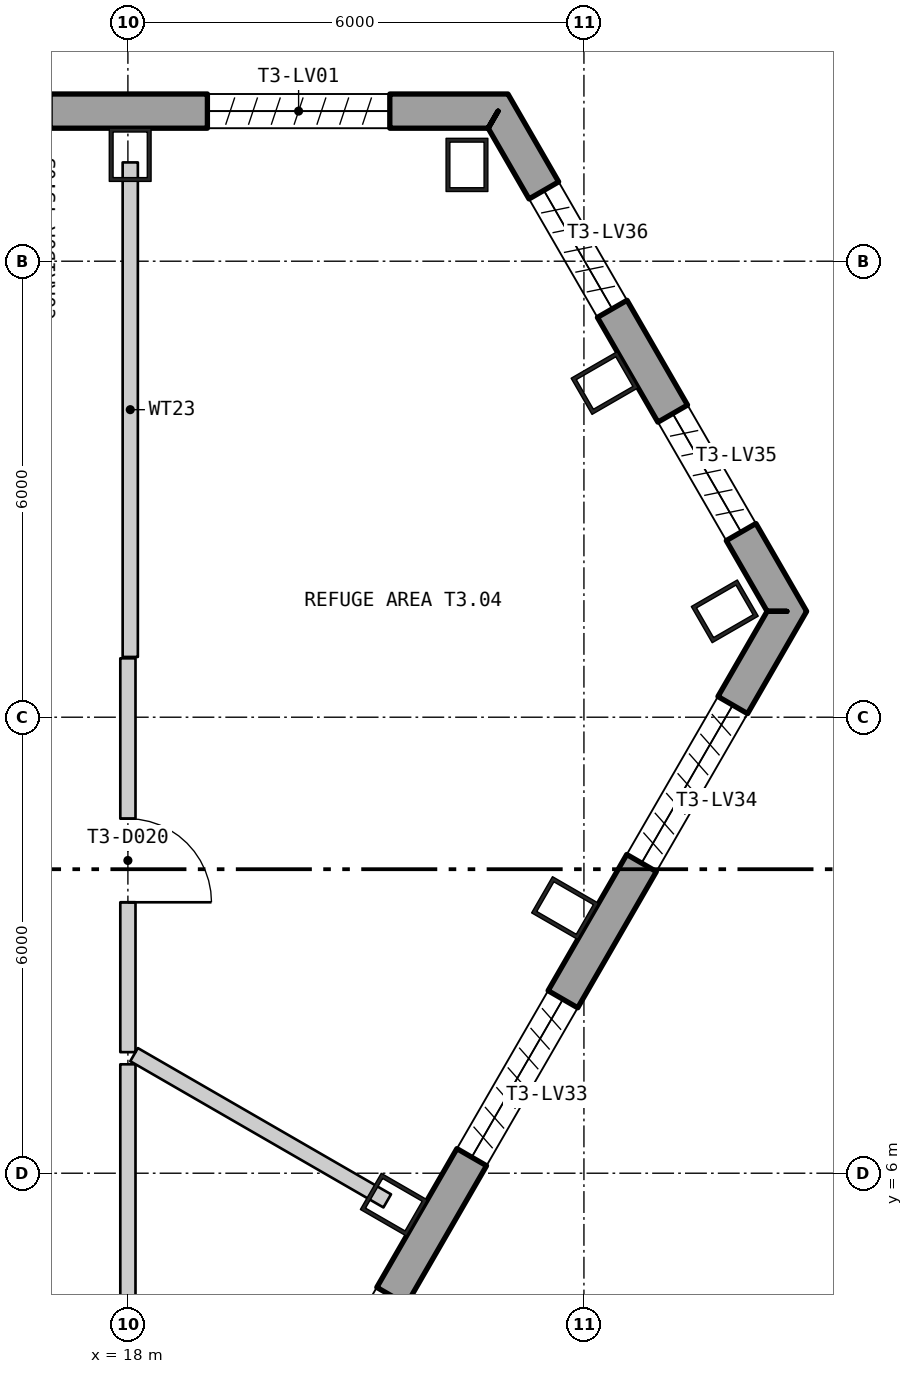
"""IFC4 building model, lengths in metres.
Left out: names, types, materials, properties, quantities, classifications, styles, units other than length and angle.
Written with IfcOpenShell. Run it as: python <this file> out.ifc"""

import sys

from ifc_helpers import new_model, si_unit, direction, frame, frame_2d, origin, origin_2d, place, context, subcontext, project, spatial, polyline, rectangle, hollow_rectangle, outline, extrude, element, fill, save


model = new_model("IFC4")
c1 = context("Model", 3, precision=1e-05, world=origin(), true_north=direction((0.0, 1.0)))
c2 = subcontext(c1, "Body", "Model", "MODEL_VIEW")
j1 = project(units=[si_unit("LENGTHUNIT", "METRE"), si_unit("PLANEANGLEUNIT", "RADIAN")], contexts=[c1])
p1 = place(None, origin())
s1 = spatial("IfcSite", under=j1, at=p1, CompositionType="ELEMENT")
p2 = place(p1, origin())
s2 = spatial("IfcBuilding", under=s1, at=p2, CompositionType="ELEMENT")
p3 = place(p2, frame((0.0, 0.0, 186.6)))
s3 = spatial("IfcBuildingStorey", under=s2, at=p3, CompositionType="ELEMENT", Elevation=186.6)
for number, where, z_axis, x_axis in (
    (1, (22.461, 19.267, 0.0), (0.0, 0.0, 1.0), (-1.0, 0.0, 0.0)),
    (2, (18.03, 19.4, 0.0), (0.0, 0.0, 1.0), (-1.0, 0.0, 0.0)),
    (3, (21.499, 5.586, 0.0), (0.0, 0.0, 1.0), (0.5, 0.866, 0.0)),
    (4, (23.752, 9.489, 0.0), (0.0, 0.0, 1.0), (0.5, 0.866, 0.0)),
    (5, (25.853, 13.393, 0.0), (0.0, 0.0, 1.0), (-0.5, 0.866, 0.0)),
    (6, (24.272, 16.397, 0.0), (0.0, 0.0, 1.0), (-0.5, 0.866, 0.0)),
):
    element("IfcColumn", number, at=place(p3, frame(where, z_axis=z_axis, x_axis=x_axis)), inside=s3, PredefinedType="COLUMN", context=c2, shape_type="SweptSolid", body=[
        extrude(hollow_rectangle(XDim=0.55, YDim=0.7, WallThickness=0.05, at=origin_2d()), origin(), (0.0, 0.0, 1.0), 6.0),
    ])
p4 = place(p3, frame((22.87, 19.975, -0.4), z_axis=(0.0, 0.0, 1.0), x_axis=(-1.0, 0.0, 0.0)))
e7 = element("IfcWall", 7, at=p4, inside=s3, PredefinedType="SOLIDWALL", context=c2, shape_type="SweptSolid", body=[
    extrude(outline(polyline([(-0.13, -0.225), (45.87, -0.225), (45.61, 0.225), (0.13, 0.225), (-0.13, -0.225)])), origin(), (0.0, 0.0, 1.0), 6.0),
])
p5 = place(p4, frame((1.424, 0.0, 1.6)))
e8 = element("IfcOpeningElement", 8, at=p5, cuts=e7, PredefinedType="OPENING", context=c2, shape_type="SweptSolid", body=[
    extrude(rectangle(XDim=2.4, YDim=3.6, at=frame_2d((1.2, 1.8))), frame((0.0, 0.235, 0.0), z_axis=(0.0, -1.0, 0.0), x_axis=(1.0, 0.0, 0.0)), (0.0, 0.0, 1.0), 0.47),
])
p6 = place(p4, frame((5.893, 0.0, 1.6)))
e9 = element("IfcOpeningElement", 9, at=p6, cuts=e7, PredefinedType="OPENING", context=c2, shape_type="SweptSolid", body=[
    extrude(rectangle(XDim=2.4, YDim=3.6, at=frame_2d((1.2, 1.8))), frame((0.0, 0.235, 0.0), z_axis=(0.0, -1.0, 0.0), x_axis=(1.0, 0.0, 0.0)), (0.0, 0.0, 1.0), 0.47),
])
p7 = place(p4, frame((10.401, 0.0, 1.6)))
e10 = element("IfcOpeningElement", 10, at=p7, cuts=e7, PredefinedType="OPENING", context=c2, shape_type="SweptSolid", body=[
    extrude(rectangle(XDim=2.4, YDim=3.6, at=frame_2d((1.2, 1.8))), frame((0.0, 0.235, 0.0), z_axis=(0.0, -1.0, 0.0), x_axis=(1.0, 0.0, 0.0)), (0.0, 0.0, 1.0), 0.47),
])
p8 = place(p4, frame((14.909, 0.0, 1.6)))
e11 = element("IfcOpeningElement", 11, at=p8, cuts=e7, PredefinedType="OPENING", context=c2, shape_type="SweptSolid", body=[
    extrude(rectangle(XDim=2.4, YDim=3.6, at=frame_2d((1.2, 1.8))), frame((0.0, 0.235, 0.0), z_axis=(0.0, -1.0, 0.0), x_axis=(1.0, 0.0, 0.0)), (0.0, 0.0, 1.0), 0.47),
])
p9 = place(p4, frame((19.416, 0.0, 1.6)))
e12 = element("IfcOpeningElement", 12, at=p9, cuts=e7, PredefinedType="OPENING", context=c2, shape_type="SweptSolid", body=[
    extrude(rectangle(XDim=2.4, YDim=3.6, at=frame_2d((1.2, 1.8))), frame((0.0, 0.235, 0.0), z_axis=(0.0, -1.0, 0.0), x_axis=(1.0, 0.0, 0.0)), (0.0, 0.0, 1.0), 0.47),
])
p10 = place(p4, frame((23.924, 0.0, 1.6)))
e13 = element("IfcOpeningElement", 13, at=p10, cuts=e7, PredefinedType="OPENING", context=c2, shape_type="SweptSolid", body=[
    extrude(rectangle(XDim=2.4, YDim=3.6, at=frame_2d((1.2, 1.8))), frame((0.0, 0.235, 0.0), z_axis=(0.0, -1.0, 0.0), x_axis=(1.0, 0.0, 0.0)), (0.0, 0.0, 1.0), 0.47),
])
p11 = place(p4, frame((28.431, 0.0, 1.6)))
e14 = element("IfcOpeningElement", 14, at=p11, cuts=e7, PredefinedType="OPENING", context=c2, shape_type="SweptSolid", body=[
    extrude(rectangle(XDim=2.4, YDim=3.6, at=frame_2d((1.2, 1.8))), frame((0.0, 0.235, 0.0), z_axis=(0.0, -1.0, 0.0), x_axis=(1.0, 0.0, 0.0)), (0.0, 0.0, 1.0), 0.47),
])
p12 = place(p4, frame((32.939, 0.0, 1.6)))
e15 = element("IfcOpeningElement", 15, at=p12, cuts=e7, PredefinedType="OPENING", context=c2, shape_type="SweptSolid", body=[
    extrude(rectangle(XDim=2.4, YDim=3.6, at=frame_2d((1.2, 1.8))), frame((0.0, 0.235, 0.0), z_axis=(0.0, -1.0, 0.0), x_axis=(1.0, 0.0, 0.0)), (0.0, 0.0, 1.0), 0.47),
])
p13 = place(p4, frame((37.447, 0.0, 1.6)))
e16 = element("IfcOpeningElement", 16, at=p13, cuts=e7, PredefinedType="OPENING", context=c2, shape_type="SweptSolid", body=[
    extrude(rectangle(XDim=2.4, YDim=3.6, at=frame_2d((1.2, 1.8))), frame((0.0, 0.235, 0.0), z_axis=(0.0, -1.0, 0.0), x_axis=(1.0, 0.0, 0.0)), (0.0, 0.0, 1.0), 0.47),
])
p14 = place(p4, frame((41.916, 0.0, 1.6)))
e17 = element("IfcOpeningElement", 17, at=p14, cuts=e7, PredefinedType="OPENING", context=c2, shape_type="SweptSolid", body=[
    extrude(rectangle(XDim=2.4, YDim=3.6, at=frame_2d((1.2, 1.8))), frame((0.0, 0.235, 0.0), z_axis=(0.0, -1.0, 0.0), x_axis=(1.0, 0.0, 0.0)), (0.0, 0.0, 1.0), 0.47),
])
p15 = place(p3, frame((3.8, -26.219, -0.18), z_axis=(0.0, 0.0, 1.0), x_axis=(0.500000711659, 0.866024992908, 0.0)))
e18 = element("IfcWall", 18, at=p15, inside=s3, PredefinedType="SOLIDWALL", context=c2, shape_type="SweptSolid", body=[
    extrude(outline(polyline([(-0.13, -0.225), (45.87, -0.225), (45.61, 0.225), (0.13, 0.225), (-0.13, -0.225)])), origin(), (0.0, 0.0, 1.0), 6.0),
])
p16 = place(p15, frame((1.424, 0.0, 1.38)))
e19 = element("IfcOpeningElement", 19, at=p16, cuts=e18, PredefinedType="OPENING", context=c2, shape_type="SweptSolid", body=[
    extrude(rectangle(XDim=2.4, YDim=3.6, at=frame_2d((1.2, 1.8))), frame((0.0, 0.235, 0.0), z_axis=(0.0, -1.0, 0.0), x_axis=(1.0, 0.0, 0.0)), (0.0, 0.0, 1.0), 0.47),
])
p17 = place(p15, frame((5.893, 0.0, 1.38)))
e20 = element("IfcOpeningElement", 20, at=p17, cuts=e18, PredefinedType="OPENING", context=c2, shape_type="SweptSolid", body=[
    extrude(rectangle(XDim=2.4, YDim=3.6, at=frame_2d((1.2, 1.8))), frame((0.0, 0.235, 0.0), z_axis=(0.0, -1.0, 0.0), x_axis=(1.0, 0.0, 0.0)), (0.0, 0.0, 1.0), 0.47),
])
p18 = place(p15, frame((10.401, 0.0, 1.38)))
e21 = element("IfcOpeningElement", 21, at=p18, cuts=e18, PredefinedType="OPENING", context=c2, shape_type="SweptSolid", body=[
    extrude(rectangle(XDim=2.4, YDim=3.6, at=frame_2d((1.2, 1.8))), frame((0.0, 0.235, 0.0), z_axis=(0.0, -1.0, 0.0), x_axis=(1.0, 0.0, 0.0)), (0.0, 0.0, 1.0), 0.47),
])
p19 = place(p15, frame((14.909, 0.0, 1.38)))
e22 = element("IfcOpeningElement", 22, at=p19, cuts=e18, PredefinedType="OPENING", context=c2, shape_type="SweptSolid", body=[
    extrude(rectangle(XDim=2.4, YDim=3.6, at=frame_2d((1.2, 1.8))), frame((0.0, 0.235, 0.0), z_axis=(0.0, -1.0, 0.0), x_axis=(1.0, 0.0, 0.0)), (0.0, 0.0, 1.0), 0.47),
])
p20 = place(p15, frame((19.416, 0.0, 1.38)))
e23 = element("IfcOpeningElement", 23, at=p20, cuts=e18, PredefinedType="OPENING", context=c2, shape_type="SweptSolid", body=[
    extrude(rectangle(XDim=2.4, YDim=3.6, at=frame_2d((1.2, 1.8))), frame((0.0, 0.235, 0.0), z_axis=(0.0, -1.0, 0.0), x_axis=(1.0, 0.0, 0.0)), (0.0, 0.0, 1.0), 0.47),
])
p21 = place(p15, frame((23.924, 0.0, 1.38)))
e24 = element("IfcOpeningElement", 24, at=p21, cuts=e18, PredefinedType="OPENING", context=c2, shape_type="SweptSolid", body=[
    extrude(rectangle(XDim=2.4, YDim=3.6, at=frame_2d((1.2, 1.8))), frame((0.0, 0.235, 0.0), z_axis=(0.0, -1.0, 0.0), x_axis=(1.0, 0.0, 0.0)), (0.0, 0.0, 1.0), 0.47),
])
p22 = place(p15, frame((28.431, 0.0, 1.38)))
e25 = element("IfcOpeningElement", 25, at=p22, cuts=e18, PredefinedType="OPENING", context=c2, shape_type="SweptSolid", body=[
    extrude(rectangle(XDim=2.4, YDim=3.6, at=frame_2d((1.2, 1.8))), frame((0.0, 0.235, 0.0), z_axis=(0.0, -1.0, 0.0), x_axis=(1.0, 0.0, 0.0)), (0.0, 0.0, 1.0), 0.47),
])
p23 = place(p15, frame((32.939, 0.0, 1.38)))
e26 = element("IfcOpeningElement", 26, at=p23, cuts=e18, PredefinedType="OPENING", context=c2, shape_type="SweptSolid", body=[
    extrude(rectangle(XDim=2.4, YDim=3.6, at=frame_2d((1.2, 1.8))), frame((0.0, 0.235, 0.0), z_axis=(0.0, -1.0, 0.0), x_axis=(1.0, 0.0, 0.0)), (0.0, 0.0, 1.0), 0.47),
])
p24 = place(p15, frame((37.447, 0.0, 1.38)))
e27 = element("IfcOpeningElement", 27, at=p24, cuts=e18, PredefinedType="OPENING", context=c2, shape_type="SweptSolid", body=[
    extrude(rectangle(XDim=2.4, YDim=3.6, at=frame_2d((1.2, 1.8))), frame((0.0, 0.235, 0.0), z_axis=(0.0, -1.0, 0.0), x_axis=(1.0, 0.0, 0.0)), (0.0, 0.0, 1.0), 0.47),
])
p25 = place(p15, frame((41.916, 0.0, 1.38)))
e28 = element("IfcOpeningElement", 28, at=p25, cuts=e18, PredefinedType="OPENING", context=c2, shape_type="SweptSolid", body=[
    extrude(rectangle(XDim=2.4, YDim=3.6, at=frame_2d((1.2, 1.8))), frame((0.0, 0.235, 0.0), z_axis=(0.0, -1.0, 0.0), x_axis=(1.0, 0.0, 0.0)), (0.0, 0.0, 1.0), 0.47),
])
p26 = place(p3, frame((26.67, 13.393, -0.4), z_axis=(0.0, 0.0, 1.0), x_axis=(-0.499998078497, 0.866026513162, 0.0)))
e29 = element("IfcWall", 29, at=p26, inside=s3, PredefinedType="SOLIDWALL", context=c2, shape_type="SweptSolid", body=[
    extrude(outline(polyline([(-0.13, -0.225), (7.73, -0.225), (7.47, 0.225), (0.13, 0.225), (-0.13, -0.225)])), origin(), (0.0, 0.0, 1.0), 6.0),
])
p27 = place(p26, frame((1.204, 0.0, 1.6)))
e30 = element("IfcOpeningElement", 30, at=p27, cuts=e29, PredefinedType="OPENING", context=c2, shape_type="SweptSolid", body=[
    extrude(rectangle(XDim=1.8, YDim=3.6, at=frame_2d((0.9, 1.8))), frame((0.0, 0.235, 0.0), z_axis=(0.0, -1.0, 0.0), x_axis=(1.0, 0.0, 0.0)), (0.0, 0.0, 1.0), 0.47),
])
p28 = place(p26, frame((4.596, 0.0, 1.6)))
e31 = element("IfcOpeningElement", 31, at=p28, cuts=e29, PredefinedType="OPENING", context=c2, shape_type="SweptSolid", body=[
    extrude(rectangle(XDim=1.8, YDim=3.6, at=frame_2d((0.9, 1.8))), frame((0.0, 0.235, 0.0), z_axis=(0.0, -1.0, 0.0), x_axis=(1.0, 0.0, 0.0)), (0.0, 0.0, 1.0), 0.47),
])
p29 = place(p3, frame((18.0, 0.3, 0.0), z_axis=(0.0, 0.0, 1.0), x_axis=(0.0, 1.0, 0.0)))
e32 = element("IfcWall", 32, at=p29, inside=s3, PredefinedType="PARTITIONING", context=c2, shape_type="SweptSolid", body=[
    extrude(rectangle(XDim=7.133, YDim=0.2, at=frame_2d((3.567, 0.0))), origin(), (0.0, 0.0, 1.0), 5.8),
])
p30 = place(p3, frame((18.0, 7.593, 0.0), z_axis=(0.0, 0.0, 1.0), x_axis=(0.0, 1.0, 0.0)))
e33 = element("IfcWall", 33, at=p30, inside=s3, PredefinedType="PARTITIONING", context=c2, shape_type="SweptSolid", body=[
    extrude(rectangle(XDim=5.182, YDim=0.2, at=frame_2d((2.591, 0.0))), origin(), (0.0, 0.0, 1.0), 5.8),
])
p31 = place(p30, frame((1.972, 0.0, 0.0)))
e34 = element("IfcOpeningElement", 34, at=p31, cuts=e33, PredefinedType="OPENING", context=c2, shape_type="SweptSolid", body=[
    extrude(rectangle(XDim=1.1, YDim=2.1, at=frame_2d((0.55, 1.05))), frame((0.0, 0.11, 0.0), z_axis=(0.0, -1.0, 0.0), x_axis=(1.0, 0.0, 0.0)), (0.0, 0.0, 1.0), 0.22),
])
p32 = place(p3, frame((18.031, 12.793, 0.0), z_axis=(0.0, 0.0, 1.0), x_axis=(0.0, 1.0, 0.0)))
e35 = element("IfcWall", 35, at=p32, inside=s3, PredefinedType="PARTITIONING", context=c2, shape_type="SweptSolid", body=[
    extrude(rectangle(XDim=6.507, YDim=0.2, at=frame_2d((3.253, 0.0))), origin(), (0.0, 0.0, 1.0), 5.8),
])
p33 = place(p3, frame((18.081, 7.56, 0.0), z_axis=(0.0, 0.0, 1.0), x_axis=(0.86593012836, -0.500164985579, 0.0)))
e36 = element("IfcWall", 36, at=p33, inside=s3, PredefinedType="PARTITIONING", context=c2, shape_type="SweptSolid", body=[
    extrude(rectangle(XDim=3.847, YDim=0.2, at=frame_2d((1.923, 0.0))), origin(), (0.0, 0.0, 1.0), 5.8),
])
p34 = place(p31, origin())
e37 = element("IfcDoor", 37, at=p34, inside=s3, OperationType="SINGLE_SWING_LEFT", PredefinedType="DOOR", context=c2, shape_type="SweptSolid", body=[
    extrude(rectangle(XDim=1.1, YDim=2.1, at=frame_2d((0.55, 1.05))), frame((0.0, 0.025, 0.0), z_axis=(0.0, -1.0, 0.0), x_axis=(1.0, 0.0, 0.0)), (0.0, 0.0, 1.0), 0.05),
])
fill(e34, e37)
save(model, sys.argv[1])
